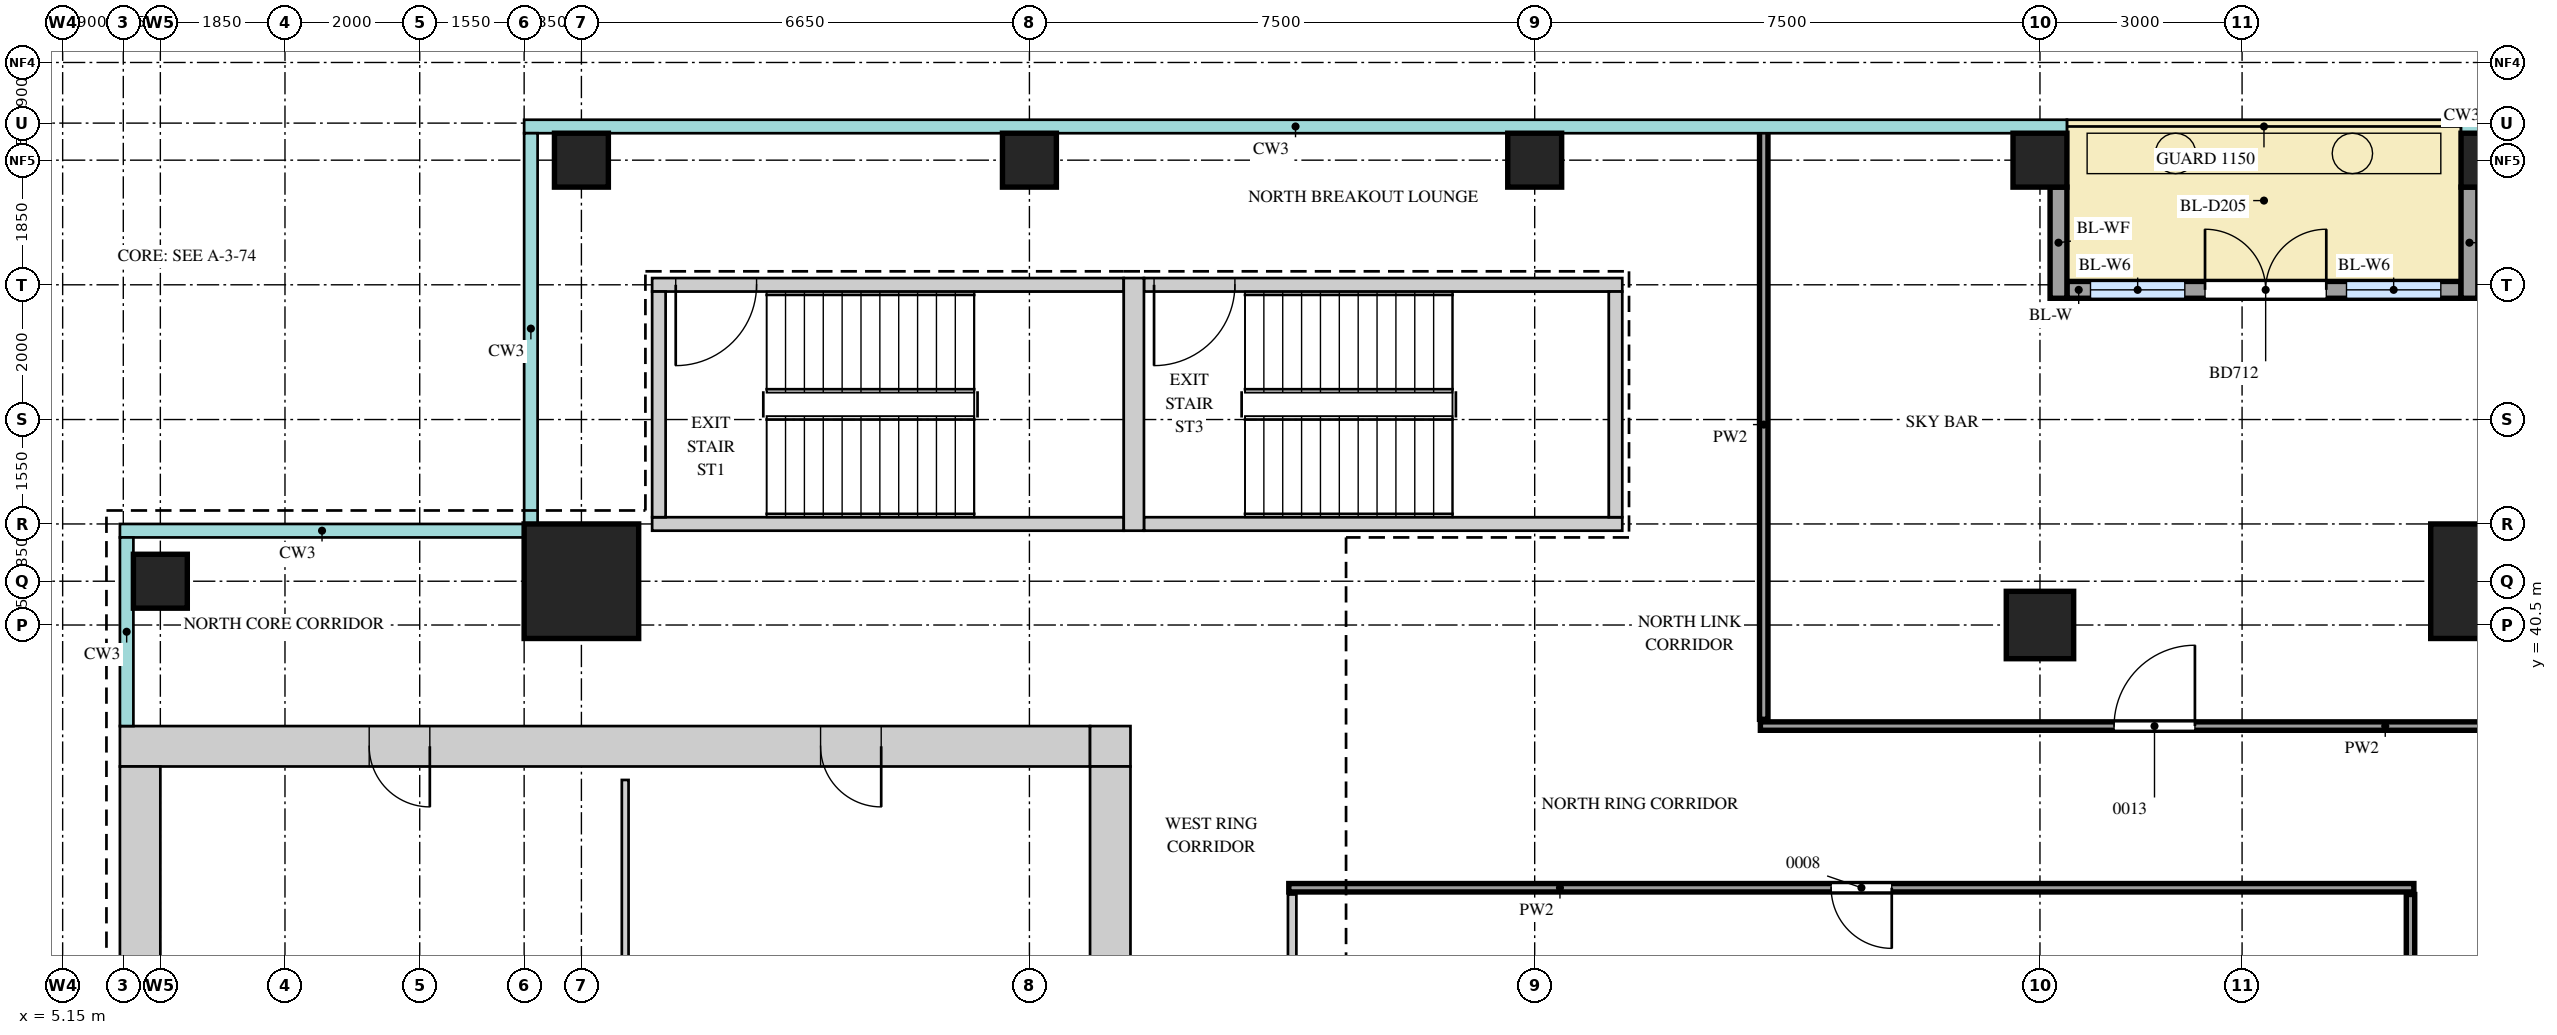
"""IFC4 building model, lengths in metres.
Left out: names, types, materials, properties, quantities, classifications, styles, units other than length and angle.
Written with IfcOpenShell. Run it as: python <this file> out.ifc"""

import sys

from ifc_helpers import new_model, si_unit, direction, frame, frame_2d, origin, origin_2d, place, context, subcontext, project, spatial, rectangle, extrude, source, transform, mapped, element, fill, save


model = new_model("IFC4")
c1 = context("Model", 3, precision=1e-05, world=origin(), true_north=direction((0.0, 1.0)))
c2 = subcontext(c1, "Body", "Model", "MODEL_VIEW")
j1 = project(units=[si_unit("LENGTHUNIT", "METRE"), si_unit("PLANEANGLEUNIT", "RADIAN")], contexts=[c1])
p1 = place(None, origin())
s1 = spatial("IfcSite", under=j1, at=p1, CompositionType="ELEMENT")
p2 = place(p1, origin())
s2 = spatial("IfcBuilding", under=s1, at=p2, CompositionType="ELEMENT")
p3 = place(p2, frame((0.0, 0.0, 314.2)))
s3 = spatial("IfcBuildingStorey", under=s2, at=p3, CompositionType="ELEMENT", Elevation=314.2)
m1 = source(origin(), c2, "Body", "SweptSolid", [
    extrude(rectangle(XDim=14.4, YDim=0.6, at=frame_2d((7.2, 0.0))), origin(), (0.0, 0.0, 1.0), 3.75),
])
p4 = place(p3, frame((6.0, 38.7, 0.0), z_axis=(0.0, 0.0, 1.0), x_axis=(1.0, 0.0, 0.0)))
e1 = element("IfcWall", 1, at=p4, inside=s3, PredefinedType="SHEAR", context=c2, shape_type="MappedRepresentation", body=[
    mapped(m1, transform((0.0, 0.0, 0.0))),
])
m2 = source(origin(), c2, "Body", "SweptSolid", [
    extrude(rectangle(XDim=0.9, YDim=2.1, at=frame_2d((0.45, 1.05))), frame((0.0, 0.31, 0.0), z_axis=(0.0, -1.0, 0.0), x_axis=(1.0, 0.0, 0.0)), (0.0, 0.0, 1.0), 0.62),
])
p5 = place(p4, frame((3.7, 0.0, 0.0)))
e2 = element("IfcOpeningElement", 2, at=p5, cuts=e1, PredefinedType="OPENING", context=c2, shape_type="MappedRepresentation", body=[
    mapped(m2, transform((0.0, 0.0, 0.0))),
])
p6 = place(p4, frame((10.4, 0.0, 0.0)))
e3 = element("IfcOpeningElement", 3, at=p6, cuts=e1, PredefinedType="OPENING", context=c2, shape_type="MappedRepresentation", body=[
    mapped(m2, transform((0.0, 0.0, 0.0))),
])
m3 = source(origin(), c2, "Body", "SweptSolid", [
    extrude(rectangle(XDim=0.6, YDim=0.6, at=frame_2d((0.3, 0.0))), origin(), (0.0, 0.0, 1.0), 3.75),
])
p7 = place(p3, frame((20.4, 38.7, 0.0), z_axis=(0.0, 0.0, 1.0), x_axis=(1.0, 0.0, 0.0)))
e4 = element("IfcWall", 4, at=p7, inside=s3, PredefinedType="SHEAR", context=c2, shape_type="MappedRepresentation", body=[
    mapped(m3, transform((0.0, 0.0, 0.0))),
])
m4 = source(origin(), c2, "Body", "SweptSolid", [
    extrude(rectangle(XDim=22.8, YDim=0.6, at=frame_2d((11.4, 0.0))), origin(), (0.0, 0.0, 1.0), 3.75),
])
p8 = place(p3, frame((20.7, 15.6, 0.0), z_axis=(0.0, 0.0, 1.0), x_axis=(0.0, 1.0, 0.0)))
e5 = element("IfcWall", 5, at=p8, inside=s3, PredefinedType="SHEAR", context=c2, shape_type="MappedRepresentation", body=[
    mapped(m4, transform((0.0, 0.0, 0.0))),
])
m5 = source(origin(), c2, "Body", "SweptSolid", [
    extrude(rectangle(XDim=1.8, YDim=2.1, at=frame_2d((0.9, 1.05))), frame((0.0, 0.31, 0.0), z_axis=(0.0, -1.0, 0.0), x_axis=(1.0, 0.0, 0.0)), (0.0, 0.0, 1.0), 0.62),
])
p9 = place(p8, frame((10.9, 0.0, 0.0)))
e6 = element("IfcOpeningElement", 6, at=p9, cuts=e5, PredefinedType="OPENING", context=c2, shape_type="MappedRepresentation", body=[
    mapped(m5, transform((0.0, 0.0, 0.0))),
])
p10 = place(p8, frame((0.55, 0.0, 0.0)))
e7 = element("IfcOpeningElement", 7, at=p10, cuts=e5, PredefinedType="OPENING", context=c2, shape_type="MappedRepresentation", body=[
    mapped(m2, transform((0.0, 0.0, 0.0))),
])
p11 = place(p8, frame((3.0, 0.0, 0.0)))
e8 = element("IfcOpeningElement", 8, at=p11, cuts=e5, PredefinedType="OPENING", context=c2, shape_type="MappedRepresentation", body=[
    mapped(m2, transform((0.0, 0.0, 0.0))),
])
p12 = place(p8, frame((5.75, 0.0, 0.0)))
e9 = element("IfcOpeningElement", 9, at=p12, cuts=e5, PredefinedType="OPENING", context=c2, shape_type="MappedRepresentation", body=[
    mapped(m2, transform((0.0, 0.0, 0.0))),
])
p13 = place(p3, frame((6.3, 15.6, 0.0), z_axis=(0.0, 0.0, 1.0), x_axis=(0.0, 1.0, 0.0)))
e10 = element("IfcWall", 10, at=p13, inside=s3, PredefinedType="SHEAR", context=c2, shape_type="MappedRepresentation", body=[
    mapped(m4, transform((0.0, 0.0, 0.0))),
])
m6 = source(origin(), c2, "Body", "SweptSolid", [
    extrude(rectangle(XDim=7.0, YDim=0.2, at=frame_2d((3.5, 0.0))), origin(), (0.0, 0.0, 1.0), 3.75),
])
p14 = place(p3, frame((13.9, 45.55, 0.0), z_axis=(0.0, 0.0, 1.0), x_axis=(1.0, 0.0, 0.0)))
e11 = element("IfcWall", 11, at=p14, inside=s3, PredefinedType="SHEAR", context=c2, shape_type="MappedRepresentation", body=[
    mapped(m6, transform((0.0, 0.0, 0.0))),
])
m7 = source(origin(), c2, "Body", "SweptSolid", [
    extrude(rectangle(XDim=1.2, YDim=2.1, at=frame_2d((0.6, 1.05))), frame((0.0, 0.11, 0.0), z_axis=(0.0, -1.0, 0.0), x_axis=(1.0, 0.0, 0.0)), (0.0, 0.0, 1.0), 0.22),
])
p15 = place(p14, frame((0.35, 0.0, 0.0)))
e12 = element("IfcOpeningElement", 12, at=p15, cuts=e11, PredefinedType="OPENING", context=c2, shape_type="MappedRepresentation", body=[
    mapped(m7, transform((0.0, 0.0, 0.0))),
])
p16 = place(p3, frame((13.9, 42.0, 0.0), z_axis=(0.0, 0.0, 1.0), x_axis=(1.0, 0.0, 0.0)))
e13 = element("IfcWall", 13, at=p16, inside=s3, PredefinedType="SHEAR", context=c2, shape_type="MappedRepresentation", body=[
    mapped(m6, transform((0.0, 0.0, 0.0))),
])
m8 = source(origin(), c2, "Body", "SweptSolid", [
    extrude(rectangle(XDim=7.1, YDim=0.2, at=frame_2d((3.55, 0.0))), origin(), (0.0, 0.0, 1.0), 3.75),
])
p17 = place(p3, frame((21.2, 45.55, 0.0), z_axis=(0.0, 0.0, 1.0), x_axis=(1.0, 0.0, 0.0)))
e14 = element("IfcWall", 14, at=p17, inside=s3, PredefinedType="SHEAR", context=c2, shape_type="MappedRepresentation", body=[
    mapped(m8, transform((0.0, 0.0, 0.0))),
])
p18 = place(p17, frame((0.15, 0.0, 0.0)))
e15 = element("IfcOpeningElement", 15, at=p18, cuts=e14, PredefinedType="OPENING", context=c2, shape_type="MappedRepresentation", body=[
    mapped(m7, transform((0.0, 0.0, 0.0))),
])
p19 = place(p3, frame((21.2, 42.0, 0.0), z_axis=(0.0, 0.0, 1.0), x_axis=(1.0, 0.0, 0.0)))
e16 = element("IfcWall", 16, at=p19, inside=s3, PredefinedType="SHEAR", context=c2, shape_type="MappedRepresentation", body=[
    mapped(m8, transform((0.0, 0.0, 0.0))),
])
m9 = source(origin(), c2, "Body", "SweptSolid", [
    extrude(rectangle(XDim=3.75, YDim=0.3, at=frame_2d((1.875, 0.0))), origin(), (0.0, 0.0, 1.0), 3.75),
])
p20 = place(p3, frame((21.05, 41.9, 0.0), z_axis=(0.0, 0.0, 1.0), x_axis=(0.0, 1.0, 0.0)))
e17 = element("IfcWall", 17, at=p20, inside=s3, PredefinedType="SHEAR", context=c2, shape_type="MappedRepresentation", body=[
    mapped(m9, transform((0.0, 0.0, 0.0))),
])
m10 = source(origin(), c2, "Body", "SweptSolid", [
    extrude(rectangle(XDim=3.35, YDim=0.2, at=frame_2d((1.675, 0.0))), origin(), (0.0, 0.0, 1.0), 3.75),
])
for number, where, z_axis, x_axis in (
    (18, (14.0, 42.1, 0.0), (0.0, 0.0, 1.0), (0.0, 1.0, 0.0)),
    (19, (28.2, 42.1, 0.0), (0.0, 0.0, 1.0), (0.0, 1.0, 0.0)),
):
    element("IfcWall", number, at=place(p3, frame(where, z_axis=z_axis, x_axis=x_axis)), inside=s3, PredefinedType="SHEAR", context=c2, shape_type="MappedRepresentation", body=[
        mapped(m10, transform((0.0, 0.0, 0.0))),
    ])
m11 = source(origin(), c2, "Body", "SweptSolid", [
    extrude(rectangle(XDim=1.7, YDim=1.7, at=origin_2d()), origin(), (0.0, 0.0, 1.0), 3.75),
])
for number, where, z_axis, x_axis in (
    (20, (41.15, 41.15, 0.0), (0.0, 0.0, 1.0), (1.0, 0.0, 0.0)),
    (21, (12.85, 41.15, 0.0), (0.0, 0.0, 1.0), (1.0, 0.0, 0.0)),
):
    element("IfcColumn", number, at=place(p3, frame(where, z_axis=z_axis, x_axis=x_axis)), inside=s3, PredefinedType="COLUMN", context=c2, shape_type="MappedRepresentation", body=[
        mapped(m11, transform((0.0, 0.0, 0.0))),
    ])
m12 = source(origin(), c2, "Body", "SweptSolid", [
    extrude(rectangle(XDim=0.8, YDim=0.8, at=origin_2d()), origin(), (0.0, 0.0, 1.0), 3.75),
])
for number, where, z_axis, x_axis in (
    (22, (12.85, 47.4, 0.0), (0.0, 0.0, 1.0), (1.0, 0.0, 0.0)),
    (23, (19.5, 47.4, 0.0), (0.0, 0.0, 1.0), (1.0, 0.0, 0.0)),
    (24, (27.0, 47.4, 0.0), (0.0, 0.0, 1.0), (1.0, 0.0, 0.0)),
    (25, (34.5, 47.4, 0.0), (0.0, 0.0, 1.0), (1.0, 0.0, 0.0)),
    (26, (41.15, 47.4, 0.0), (0.0, 0.0, 1.0), (1.0, 0.0, 0.0)),
    (27, (6.6, 41.15, 0.0), (0.0, 0.0, 1.0), (1.0, 0.0, 0.0)),
):
    element("IfcColumn", number, at=place(p3, frame(where, z_axis=z_axis, x_axis=x_axis)), inside=s3, PredefinedType="COLUMN", context=c2, shape_type="MappedRepresentation", body=[
        mapped(m12, transform((0.0, 0.0, 0.0))),
    ])
m13 = source(origin(), c2, "Body", "SweptSolid", [
    extrude(rectangle(XDim=1.0, YDim=1.0, at=origin_2d()), origin(), (0.0, 0.0, 1.0), 3.75),
])
p21 = place(p3, frame((34.5, 40.5, 0.0), z_axis=(0.0, 0.0, 1.0), x_axis=(1.0, 0.0, 0.0)))
e28 = element("IfcColumn", 28, at=p21, inside=s3, PredefinedType="COLUMN", context=c2, shape_type="MappedRepresentation", body=[
    mapped(m13, transform((0.0, 0.0, 0.0))),
])
m14 = source(origin(), c2, "Body", "SweptSolid", [
    extrude(rectangle(XDim=5.85, YDim=0.25, at=frame_2d((2.925, 0.0))), origin(), (0.0, 0.0, 1.0), 3.75),
])
p22 = place(p3, frame((34.9, 45.475, 0.0), z_axis=(0.0, 0.0, 1.0), x_axis=(1.0, 0.0, 0.0)))
e29 = element("IfcWall", 29, at=p22, inside=s3, PredefinedType="SOLIDWALL", context=c2, shape_type="MappedRepresentation", body=[
    mapped(m14, transform((0.0, 0.0, 0.0))),
])
m15 = source(origin(), c2, "Body", "SweptSolid", [
    extrude(rectangle(XDim=1.4, YDim=2.4, at=frame_2d((0.7, 1.2))), frame((0.0, 0.135, 0.0), z_axis=(0.0, -1.0, 0.0), x_axis=(1.0, 0.0, 0.0)), (0.0, 0.0, 1.0), 0.27),
])
p23 = place(p22, frame((0.35, 0.0, 0.0)))
e30 = element("IfcOpeningElement", 30, at=p23, cuts=e29, PredefinedType="OPENING", context=c2, shape_type="MappedRepresentation", body=[
    mapped(m15, transform((0.0, 0.0, 0.0))),
])
p24 = place(p22, frame((4.15, 0.0, 0.0)))
e31 = element("IfcOpeningElement", 31, at=p24, cuts=e29, PredefinedType="OPENING", context=c2, shape_type="MappedRepresentation", body=[
    mapped(m15, transform((0.0, 0.0, 0.0))),
])
m16 = source(origin(), c2, "Body", "SweptSolid", [
    extrude(rectangle(XDim=1.8, YDim=2.4, at=frame_2d((0.9, 1.2))), frame((0.0, 0.135, 0.0), z_axis=(0.0, -1.0, 0.0), x_axis=(1.0, 0.0, 0.0)), (0.0, 0.0, 1.0), 0.27),
])
p25 = place(p22, frame((2.05, 0.0, 0.0)))
e32 = element("IfcOpeningElement", 32, at=p25, cuts=e29, PredefinedType="OPENING", context=c2, shape_type="MappedRepresentation", body=[
    mapped(m16, transform((0.0, 0.0, 0.0))),
])
m17 = source(origin(), c2, "Body", "SweptSolid", [
    extrude(rectangle(XDim=1.65, YDim=0.25, at=frame_2d((0.825, 0.0))), origin(), (0.0, 0.0, 1.0), 3.45),
])
for number, where, z_axis, x_axis in (
    (33, (34.775, 47.0, 0.0), (0.0, 0.0, 1.0), (0.0, -1.0, 0.0)),
    (34, (40.875, 47.0, 0.0), (0.0, 0.0, 1.0), (0.0, -1.0, 0.0)),
):
    element("IfcWall", number, at=place(p3, frame(where, z_axis=z_axis, x_axis=x_axis)), inside=s3, PredefinedType="SOLIDWALL", context=c2, shape_type="MappedRepresentation", body=[
        mapped(m17, transform((0.0, 0.0, 0.0))),
    ])
m18 = source(origin(), c2, "Body", "SweptSolid", [
    extrude(rectangle(XDim=19.0, YDim=0.125, at=frame_2d((9.5, 0.0))), origin(), (0.0, 0.0, 1.0), 3.8),
])
p26 = place(p3, frame((23.4, 17.5, 0.0), z_axis=(0.0, 0.0, 1.0), x_axis=(0.0, 1.0, 0.0)))
e35 = element("IfcWall", 35, at=p26, inside=s3, PredefinedType="PARTITIONING", context=c2, shape_type="MappedRepresentation", body=[
    mapped(m18, transform((0.0, 0.0, 0.0))),
])
m19 = source(origin(), c2, "Body", "SweptSolid", [
    extrude(rectangle(XDim=0.9, YDim=2.1, at=frame_2d((0.45, 1.05))), frame((0.0, 0.073, 0.0), z_axis=(0.0, -1.0, 0.0), x_axis=(1.0, 0.0, 0.0)), (0.0, 0.0, 1.0), 0.145),
])
p27 = place(p26, frame((10.4, 0.0, 0.0)))
e36 = element("IfcOpeningElement", 36, at=p27, cuts=e35, PredefinedType="OPENING", context=c2, shape_type="MappedRepresentation", body=[
    mapped(m19, transform((0.0, 0.0, 0.0))),
])
p28 = place(p3, frame((40.0, 17.5, 0.0), z_axis=(0.0, 0.0, 1.0), x_axis=(0.0, 1.0, 0.0)))
e37 = element("IfcWall", 37, at=p28, inside=s3, PredefinedType="PARTITIONING", context=c2, shape_type="MappedRepresentation", body=[
    mapped(m18, transform((0.0, 0.0, 0.0))),
])
m20 = source(origin(), c2, "Body", "SweptSolid", [
    extrude(rectangle(XDim=6.0, YDim=0.1, at=frame_2d((3.0, 0.0))), origin(), (0.0, 0.0, 1.0), 3.8),
])
p29 = place(p3, frame((13.5, 32.2, 0.0), z_axis=(0.0, 0.0, 1.0), x_axis=(0.0, 1.0, 0.0)))
e38 = element("IfcWall", 38, at=p29, inside=s3, PredefinedType="PARTITIONING", context=c2, shape_type="MappedRepresentation", body=[
    mapped(m20, transform((0.0, 0.0, 0.0))),
])
m21 = source(origin(), c2, "Body", "SweptSolid", [
    extrude(rectangle(XDim=16.7, YDim=0.125, at=frame_2d((8.35, 0.0))), origin(), (0.0, 0.0, 1.0), 3.8),
])
p30 = place(p3, frame((23.35, 36.6, 0.0), z_axis=(0.0, 0.0, 1.0), x_axis=(1.0, 0.0, 0.0)))
e39 = element("IfcWall", 39, at=p30, inside=s3, PredefinedType="PARTITIONING", context=c2, shape_type="MappedRepresentation", body=[
    mapped(m21, transform((0.0, 0.0, 0.0))),
])
p31 = place(p30, frame((8.05, 0.0, 0.0)))
e40 = element("IfcOpeningElement", 40, at=p31, cuts=e39, PredefinedType="OPENING", context=c2, shape_type="MappedRepresentation", body=[
    mapped(m19, transform((0.0, 0.0, 0.0))),
])
m22 = source(origin(), c2, "Body", "SweptSolid", [
    extrude(rectangle(XDim=12.1, YDim=0.125, at=frame_2d((6.05, 0.0))), origin(), (0.0, 0.0, 1.0), 3.8),
])
p32 = place(p3, frame((30.35, 39.0, 0.0), z_axis=(0.0, 0.0, 1.0), x_axis=(1.0, 0.0, 0.0)))
e41 = element("IfcWall", 41, at=p32, inside=s3, PredefinedType="PARTITIONING", context=c2, shape_type="MappedRepresentation", body=[
    mapped(m22, transform((0.0, 0.0, 0.0))),
])
m23 = source(origin(), c2, "Body", "SweptSolid", [
    extrude(rectangle(XDim=1.2, YDim=2.1, at=frame_2d((0.6, 1.05))), frame((0.0, 0.073, 0.0), z_axis=(0.0, -1.0, 0.0), x_axis=(1.0, 0.0, 0.0)), (0.0, 0.0, 1.0), 0.145),
])
p33 = place(p32, frame((5.25, 0.0, 0.0)))
e42 = element("IfcOpeningElement", 42, at=p33, cuts=e41, PredefinedType="OPENING", context=c2, shape_type="MappedRepresentation", body=[
    mapped(m23, transform((0.0, 0.0, 0.0))),
])
m24 = source(origin(), c2, "Body", "SweptSolid", [
    extrude(rectangle(XDim=8.75, YDim=0.125, at=frame_2d((4.375, 0.0))), origin(), (0.0, 0.0, 1.0), 3.8),
])
p34 = place(p3, frame((30.4, 39.1, 0.0), z_axis=(0.0, 0.0, 1.0), x_axis=(0.0, 1.0, 0.0)))
e43 = element("IfcWall", 43, at=p34, inside=s3, PredefinedType="PARTITIONING", context=c2, shape_type="MappedRepresentation", body=[
    mapped(m24, transform((0.0, 0.0, 0.0))),
])
m25 = source(origin(), c2, "Body", "SweptSolid", [
    extrude(rectangle(XDim=1.4, YDim=2.4, at=frame_2d((0.7, 1.2))), frame((0.0, 0.03, 0.0), z_axis=(0.0, -1.0, 0.0), x_axis=(1.0, 0.0, 0.0)), (0.0, 0.0, 1.0), 0.06),
])
p35 = place(p23, origin())
e44 = element("IfcWindow", 44, at=p35, inside=s3, PartitioningType="SINGLE_PANEL", PredefinedType="WINDOW", context=c2, shape_type="MappedRepresentation", body=[
    mapped(m25, transform((0.0, 0.0, 0.0))),
])
fill(e30, e44)
p36 = place(p24, origin())
e45 = element("IfcWindow", 45, at=p36, inside=s3, PartitioningType="SINGLE_PANEL", PredefinedType="WINDOW", context=c2, shape_type="MappedRepresentation", body=[
    mapped(m25, transform((0.0, 0.0, 0.0))),
])
fill(e31, e45)
m26 = source(origin(), c2, "Body", "SweptSolid", [
    extrude(rectangle(XDim=1.8, YDim=2.4, at=frame_2d((0.9, 1.2))), frame((0.0, 0.025, 0.0), z_axis=(0.0, -1.0, 0.0), x_axis=(1.0, 0.0, 0.0)), (0.0, 0.0, 1.0), 0.05),
])
p37 = place(p25, origin())
e46 = element("IfcDoor", 46, at=p37, inside=s3, OperationType="DOUBLE_DOOR_DOUBLE_SWING", PredefinedType="DOOR", context=c2, shape_type="MappedRepresentation", body=[
    mapped(m26, transform((0.0, 0.0, 0.0))),
])
fill(e32, e46)
m27 = source(origin(), c2, "Body", "SweptSolid", [
    extrude(rectangle(XDim=0.9, YDim=2.1, at=frame_2d((0.45, 1.05))), frame((0.0, 0.25, 0.0), z_axis=(0.0, -1.0, 0.0), x_axis=(1.0, 0.0, 0.0)), (0.0, 0.0, 1.0), 0.5),
])
p38 = place(p5, origin())
e47 = element("IfcDoor", 47, at=p38, inside=s3, OperationType="SINGLE_SWING_RIGHT", PredefinedType="DOOR", context=c2, shape_type="MappedRepresentation", body=[
    mapped(m27, transform((0.0, 0.0, 0.0))),
])
fill(e2, e47)
p39 = place(p6, origin())
e48 = element("IfcDoor", 48, at=p39, inside=s3, OperationType="SINGLE_SWING_RIGHT", PredefinedType="DOOR", context=c2, shape_type="MappedRepresentation", body=[
    mapped(m27, transform((0.0, 0.0, 0.0))),
])
fill(e3, e48)
m28 = source(origin(), c2, "Body", "SweptSolid", [
    extrude(rectangle(XDim=1.2, YDim=2.1, at=frame_2d((0.6, 1.05))), frame((0.0, 0.025, 0.0), z_axis=(0.0, -1.0, 0.0), x_axis=(1.0, 0.0, 0.0)), (0.0, 0.0, 1.0), 0.05),
])
p40 = place(p33, origin())
e49 = element("IfcDoor", 49, at=p40, inside=s3, OperationType="SINGLE_SWING_LEFT", PredefinedType="DOOR", context=c2, shape_type="MappedRepresentation", body=[
    mapped(m28, transform((0.0, 0.0, 0.0))),
])
fill(e42, e49)
m29 = source(origin(), c2, "Body", "SweptSolid", [
    extrude(rectangle(XDim=0.9, YDim=2.1, at=frame_2d((0.45, 1.05))), frame((0.0, 0.025, 0.0), z_axis=(0.0, -1.0, 0.0), x_axis=(1.0, 0.0, 0.0)), (0.0, 0.0, 1.0), 0.05),
])
p41 = place(p31, origin())
e50 = element("IfcDoor", 50, at=p41, inside=s3, OperationType="SINGLE_SWING_RIGHT", PredefinedType="DOOR", context=c2, shape_type="MappedRepresentation", body=[
    mapped(m29, transform((0.0, 0.0, 0.0))),
])
fill(e40, e50)
p42 = place(p15, origin())
e51 = element("IfcDoor", 51, at=p42, inside=s3, OperationType="SINGLE_SWING_LEFT", PredefinedType="DOOR", context=c2, shape_type="MappedRepresentation", body=[
    mapped(m28, transform((0.0, 0.0, 0.0))),
])
fill(e12, e51)
p43 = place(p18, origin())
e52 = element("IfcDoor", 52, at=p43, inside=s3, OperationType="SINGLE_SWING_LEFT", PredefinedType="DOOR", context=c2, shape_type="MappedRepresentation", body=[
    mapped(m28, transform((0.0, 0.0, 0.0))),
])
fill(e15, e52)
save(model, sys.argv[1])
